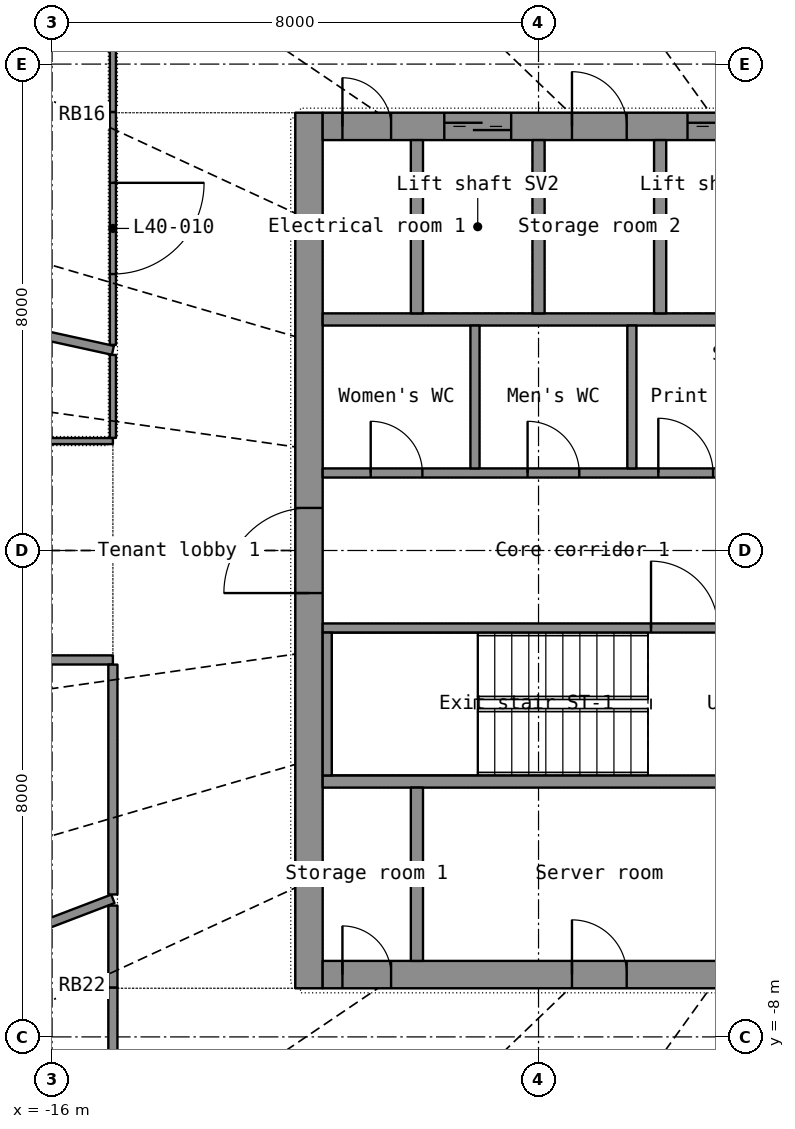
"""IFC4 building model, lengths in metres.
Left out: names, types, materials, properties, quantities, classifications, styles, units other than length and angle.
Written with IfcOpenShell. Run it as: python <this file> out.ifc"""

import sys

from ifc_helpers import new_model, si_unit, direction, frame, frame_2d, origin, place, context, subcontext, project, spatial, rectangle, extrude, element, fill, save


model = new_model("IFC4")
c1 = context("Model", 3, precision=1e-05, world=origin(), true_north=direction((0.0, 1.0)))
c2 = subcontext(c1, "Body", "Model", "MODEL_VIEW")
j1 = project(units=[si_unit("LENGTHUNIT", "METRE"), si_unit("PLANEANGLEUNIT", "RADIAN")], contexts=[c1])
p1 = place(None, origin())
s1 = spatial("IfcSite", under=j1, at=p1, CompositionType="ELEMENT")
p2 = place(p1, origin())
s2 = spatial("IfcBuilding", under=s1, at=p2, CompositionType="ELEMENT")
p3 = place(p2, frame((0.0, 0.0, 168.2)))
s3 = spatial("IfcBuildingStorey", under=s2, at=p3, CompositionType="ELEMENT", Elevation=168.2)
p4 = place(p3, frame((-11.775, -7.2, 0.0), z_axis=(0.0, 0.0, 1.0), x_axis=(0.0, 1.0, 0.0)))
e1 = element("IfcWall", 1, at=p4, inside=s3, PredefinedType="SHEAR", context=c2, shape_type="SweptSolid", body=[
    extrude(rectangle(XDim=14.4, YDim=0.45, at=frame_2d((7.2, 0.0))), origin(), (0.0, 0.0, 1.0), 3.3),
])
p5 = place(p4, frame((6.5, 0.0, 0.0)))
e2 = element("IfcOpeningElement", 2, at=p5, cuts=e1, PredefinedType="OPENING", context=c2, shape_type="SweptSolid", body=[
    extrude(rectangle(XDim=1.4, YDim=2.2, at=frame_2d((0.7, 1.1))), frame((0.0, 0.235, 0.0), z_axis=(0.0, -1.0, 0.0), x_axis=(1.0, 0.0, 0.0)), (0.0, 0.0, 1.0), 0.47),
])
p6 = place(p3, frame((-11.55, -6.975, 0.0), z_axis=(0.0, 0.0, 1.0), x_axis=(1.0, 0.0, 0.0)))
e3 = element("IfcWall", 3, at=p6, inside=s3, PredefinedType="SHEAR", context=c2, shape_type="SweptSolid", body=[
    extrude(rectangle(XDim=23.1, YDim=0.45, at=frame_2d((11.55, 0.0))), origin(), (0.0, 0.0, 1.0), 3.3),
])
p7 = place(p6, frame((20.0, 0.0, 0.0)))
e4 = element("IfcOpeningElement", 4, at=p7, cuts=e3, PredefinedType="OPENING", context=c2, shape_type="SweptSolid", body=[
    extrude(rectangle(XDim=1.1, YDim=2.2, at=frame_2d((0.55, 1.1))), frame((0.0, 0.235, 0.0), z_axis=(0.0, -1.0, 0.0), x_axis=(1.0, 0.0, 0.0)), (0.0, 0.0, 1.0), 0.47),
])
p8 = place(p6, frame((4.1, 0.0, 0.0)))
e5 = element("IfcOpeningElement", 5, at=p8, cuts=e3, PredefinedType="OPENING", context=c2, shape_type="SweptSolid", body=[
    extrude(rectangle(XDim=0.9, YDim=2.1, at=frame_2d((0.45, 1.05))), frame((0.0, 0.235, 0.0), z_axis=(0.0, -1.0, 0.0), x_axis=(1.0, 0.0, 0.0)), (0.0, 0.0, 1.0), 0.47),
])
p9 = place(p6, frame((11.1, 0.0, 0.0)))
e6 = element("IfcOpeningElement", 6, at=p9, cuts=e3, PredefinedType="OPENING", context=c2, shape_type="SweptSolid", body=[
    extrude(rectangle(XDim=0.9, YDim=2.1, at=frame_2d((0.45, 1.05))), frame((0.0, 0.235, 0.0), z_axis=(0.0, -1.0, 0.0), x_axis=(1.0, 0.0, 0.0)), (0.0, 0.0, 1.0), 0.47),
])
p10 = place(p6, frame((17.1, 0.0, 0.0)))
e7 = element("IfcOpeningElement", 7, at=p10, cuts=e3, PredefinedType="OPENING", context=c2, shape_type="SweptSolid", body=[
    extrude(rectangle(XDim=0.9, YDim=2.1, at=frame_2d((0.45, 1.05))), frame((0.0, 0.235, 0.0), z_axis=(0.0, -1.0, 0.0), x_axis=(1.0, 0.0, 0.0)), (0.0, 0.0, 1.0), 0.47),
])
p11 = place(p6, frame((0.325, 0.0, 0.0)))
e8 = element("IfcOpeningElement", 8, at=p11, cuts=e3, PredefinedType="OPENING", context=c2, shape_type="SweptSolid", body=[
    extrude(rectangle(XDim=0.8, YDim=2.05, at=frame_2d((0.4, 1.025))), frame((0.0, 0.235, 0.0), z_axis=(0.0, -1.0, 0.0), x_axis=(1.0, 0.0, 0.0)), (0.0, 0.0, 1.0), 0.47),
])
p12 = place(p6, frame((21.975, 0.0, 0.0)))
e9 = element("IfcOpeningElement", 9, at=p12, cuts=e3, PredefinedType="OPENING", context=c2, shape_type="SweptSolid", body=[
    extrude(rectangle(XDim=0.8, YDim=2.05, at=frame_2d((0.4, 1.025))), frame((0.0, 0.235, 0.0), z_axis=(0.0, -1.0, 0.0), x_axis=(1.0, 0.0, 0.0)), (0.0, 0.0, 1.0), 0.47),
])
p13 = place(p3, frame((-11.55, 6.975, 0.0), z_axis=(0.0, 0.0, 1.0), x_axis=(1.0, 0.0, 0.0)))
e10 = element("IfcWall", 10, at=p13, inside=s3, PredefinedType="SHEAR", context=c2, shape_type="SweptSolid", body=[
    extrude(rectangle(XDim=23.1, YDim=0.45, at=frame_2d((11.55, 0.0))), origin(), (0.0, 0.0, 1.0), 3.3),
])
p14 = place(p13, frame((2.0, 0.0, 0.0)))
e11 = element("IfcOpeningElement", 11, at=p14, cuts=e10, PredefinedType="OPENING", context=c2, shape_type="SweptSolid", body=[
    extrude(rectangle(XDim=1.1, YDim=2.2, at=frame_2d((0.55, 1.1))), frame((0.0, 0.235, 0.0), z_axis=(0.0, -1.0, 0.0), x_axis=(1.0, 0.0, 0.0)), (0.0, 0.0, 1.0), 0.47),
])
p15 = place(p13, frame((6.0, 0.0, 0.0)))
e12 = element("IfcOpeningElement", 12, at=p15, cuts=e10, PredefinedType="OPENING", context=c2, shape_type="SweptSolid", body=[
    extrude(rectangle(XDim=1.1, YDim=2.2, at=frame_2d((0.55, 1.1))), frame((0.0, 0.235, 0.0), z_axis=(0.0, -1.0, 0.0), x_axis=(1.0, 0.0, 0.0)), (0.0, 0.0, 1.0), 0.47),
])
p16 = place(p13, frame((8.0, 0.0, 0.0)))
e13 = element("IfcOpeningElement", 13, at=p16, cuts=e10, PredefinedType="OPENING", context=c2, shape_type="SweptSolid", body=[
    extrude(rectangle(XDim=1.1, YDim=2.2, at=frame_2d((0.55, 1.1))), frame((0.0, 0.235, 0.0), z_axis=(0.0, -1.0, 0.0), x_axis=(1.0, 0.0, 0.0)), (0.0, 0.0, 1.0), 0.47),
])
p17 = place(p13, frame((10.0, 0.0, 0.0)))
e14 = element("IfcOpeningElement", 14, at=p17, cuts=e10, PredefinedType="OPENING", context=c2, shape_type="SweptSolid", body=[
    extrude(rectangle(XDim=1.1, YDim=2.2, at=frame_2d((0.55, 1.1))), frame((0.0, 0.235, 0.0), z_axis=(0.0, -1.0, 0.0), x_axis=(1.0, 0.0, 0.0)), (0.0, 0.0, 1.0), 0.47),
])
p18 = place(p13, frame((12.0, 0.0, 0.0)))
e15 = element("IfcOpeningElement", 15, at=p18, cuts=e10, PredefinedType="OPENING", context=c2, shape_type="SweptSolid", body=[
    extrude(rectangle(XDim=1.1, YDim=2.2, at=frame_2d((0.55, 1.1))), frame((0.0, 0.235, 0.0), z_axis=(0.0, -1.0, 0.0), x_axis=(1.0, 0.0, 0.0)), (0.0, 0.0, 1.0), 0.47),
])
p19 = place(p13, frame((14.0, 0.0, 0.0)))
e16 = element("IfcOpeningElement", 16, at=p19, cuts=e10, PredefinedType="OPENING", context=c2, shape_type="SweptSolid", body=[
    extrude(rectangle(XDim=1.1, YDim=2.2, at=frame_2d((0.55, 1.1))), frame((0.0, 0.235, 0.0), z_axis=(0.0, -1.0, 0.0), x_axis=(1.0, 0.0, 0.0)), (0.0, 0.0, 1.0), 0.47),
])
p20 = place(p13, frame((16.0, 0.0, 0.0)))
e17 = element("IfcOpeningElement", 17, at=p20, cuts=e10, PredefinedType="OPENING", context=c2, shape_type="SweptSolid", body=[
    extrude(rectangle(XDim=1.1, YDim=2.2, at=frame_2d((0.55, 1.1))), frame((0.0, 0.235, 0.0), z_axis=(0.0, -1.0, 0.0), x_axis=(1.0, 0.0, 0.0)), (0.0, 0.0, 1.0), 0.47),
])
p21 = place(p13, frame((18.0, 0.0, 0.0)))
e18 = element("IfcOpeningElement", 18, at=p21, cuts=e10, PredefinedType="OPENING", context=c2, shape_type="SweptSolid", body=[
    extrude(rectangle(XDim=1.1, YDim=2.2, at=frame_2d((0.55, 1.1))), frame((0.0, 0.235, 0.0), z_axis=(0.0, -1.0, 0.0), x_axis=(1.0, 0.0, 0.0)), (0.0, 0.0, 1.0), 0.47),
])
p22 = place(p13, frame((20.0, 0.0, 0.0)))
e19 = element("IfcOpeningElement", 19, at=p22, cuts=e10, PredefinedType="OPENING", context=c2, shape_type="SweptSolid", body=[
    extrude(rectangle(XDim=1.1, YDim=2.2, at=frame_2d((0.55, 1.1))), frame((0.0, 0.235, 0.0), z_axis=(0.0, -1.0, 0.0), x_axis=(1.0, 0.0, 0.0)), (0.0, 0.0, 1.0), 0.47),
])
p23 = place(p13, frame((4.1, 0.0, 0.0)))
e20 = element("IfcOpeningElement", 20, at=p23, cuts=e10, PredefinedType="OPENING", context=c2, shape_type="SweptSolid", body=[
    extrude(rectangle(XDim=0.9, YDim=2.1, at=frame_2d((0.45, 1.05))), frame((0.0, 0.235, 0.0), z_axis=(0.0, -1.0, 0.0), x_axis=(1.0, 0.0, 0.0)), (0.0, 0.0, 1.0), 0.47),
])
p24 = place(p13, frame((0.325, 0.0, 0.0)))
e21 = element("IfcOpeningElement", 21, at=p24, cuts=e10, PredefinedType="OPENING", context=c2, shape_type="SweptSolid", body=[
    extrude(rectangle(XDim=0.8, YDim=2.05, at=frame_2d((0.4, 1.025))), frame((0.0, 0.235, 0.0), z_axis=(0.0, -1.0, 0.0), x_axis=(1.0, 0.0, 0.0)), (0.0, 0.0, 1.0), 0.47),
])
p25 = place(p13, frame((21.975, 0.0, 0.0)))
e22 = element("IfcOpeningElement", 22, at=p25, cuts=e10, PredefinedType="OPENING", context=c2, shape_type="SweptSolid", body=[
    extrude(rectangle(XDim=0.8, YDim=2.05, at=frame_2d((0.4, 1.025))), frame((0.0, 0.235, 0.0), z_axis=(0.0, -1.0, 0.0), x_axis=(1.0, 0.0, 0.0)), (0.0, 0.0, 1.0), 0.47),
])
for number, where, z_axis, x_axis in (
    (23, (-11.55, -3.8, 0.0), (0.0, 0.0, 1.0), (1.0, 0.0, 0.0)),
    (24, (-11.55, 3.8, 0.0), (0.0, 0.0, 1.0), (1.0, 0.0, 0.0)),
):
    element("IfcWall", number, at=place(p3, frame(where, z_axis=z_axis, x_axis=x_axis)), inside=s3, PredefinedType="SHEAR", context=c2, shape_type="SweptSolid", body=[
        extrude(rectangle(XDim=23.1, YDim=0.2, at=frame_2d((11.55, 0.0))), origin(), (0.0, 0.0, 1.0), 3.3),
    ])
for number, where, z_axis, x_axis in (
    (25, (-10.0, -6.75, 0.0), (0.0, 0.0, 1.0), (0.0, 1.0, 0.0)),
    (26, (-10.0, 3.9, 0.0), (0.0, 0.0, 1.0), (0.0, 1.0, 0.0)),
    (27, (-8.0, 3.9, 0.0), (0.0, 0.0, 1.0), (0.0, 1.0, 0.0)),
    (28, (-6.0, 3.9, 0.0), (0.0, 0.0, 1.0), (0.0, 1.0, 0.0)),
):
    element("IfcWall", number, at=place(p3, frame(where, z_axis=z_axis, x_axis=x_axis)), inside=s3, PredefinedType="SHEAR", context=c2, shape_type="SweptSolid", body=[
        extrude(rectangle(XDim=2.85, YDim=0.2, at=frame_2d((1.425, 0.0))), origin(), (0.0, 0.0, 1.0), 3.3),
    ])
p26 = place(p3, frame((-11.55, -1.275, 0.0), z_axis=(0.0, 0.0, 1.0), x_axis=(1.0, 0.0, 0.0)))
e29 = element("IfcWall", 29, at=p26, inside=s3, PredefinedType="SHEAR", context=c2, shape_type="SweptSolid", body=[
    extrude(rectangle(XDim=8.55, YDim=0.15, at=frame_2d((4.275, 0.0))), origin(), (0.0, 0.0, 1.0), 3.3),
])
p27 = place(p26, frame((5.4, 0.0, 0.0)))
e30 = element("IfcOpeningElement", 30, at=p27, cuts=e29, PredefinedType="OPENING", context=c2, shape_type="SweptSolid", body=[
    extrude(rectangle(XDim=1.1, YDim=2.15, at=frame_2d((0.55, 1.075))), frame((0.0, 0.085, 0.0), z_axis=(0.0, -1.0, 0.0), x_axis=(1.0, 0.0, 0.0)), (0.0, 0.0, 1.0), 0.17),
])
p28 = place(p26, frame((7.2, 0.0, 0.0)))
e31 = element("IfcOpeningElement", 31, at=p28, cuts=e29, PredefinedType="OPENING", context=c2, shape_type="SweptSolid", body=[
    extrude(rectangle(XDim=0.9, YDim=2.1, at=frame_2d((0.45, 1.05))), frame((0.0, 0.085, 0.0), z_axis=(0.0, -1.0, 0.0), x_axis=(1.0, 0.0, 0.0)), (0.0, 0.0, 1.0), 0.17),
])
p29 = place(p3, frame((-11.55, 1.275, 0.0), z_axis=(0.0, 0.0, 1.0), x_axis=(1.0, 0.0, 0.0)))
e32 = element("IfcWall", 32, at=p29, inside=s3, PredefinedType="PARTITIONING", context=c2, shape_type="SweptSolid", body=[
    extrude(rectangle(XDim=8.55, YDim=0.15, at=frame_2d((4.275, 0.0))), origin(), (0.0, 0.0, 1.0), 3.3),
])
p30 = place(p29, frame((0.79, 0.0, 0.0)))
e33 = element("IfcOpeningElement", 33, at=p30, cuts=e32, PredefinedType="OPENING", context=c2, shape_type="SweptSolid", body=[
    extrude(rectangle(XDim=0.85, YDim=2.1, at=frame_2d((0.425, 1.05))), frame((0.0, 0.085, 0.0), z_axis=(0.0, -1.0, 0.0), x_axis=(1.0, 0.0, 0.0)), (0.0, 0.0, 1.0), 0.17),
])
p31 = place(p29, frame((3.37, 0.0, 0.0)))
e34 = element("IfcOpeningElement", 34, at=p31, cuts=e32, PredefinedType="OPENING", context=c2, shape_type="SweptSolid", body=[
    extrude(rectangle(XDim=0.85, YDim=2.1, at=frame_2d((0.425, 1.05))), frame((0.0, 0.085, 0.0), z_axis=(0.0, -1.0, 0.0), x_axis=(1.0, 0.0, 0.0)), (0.0, 0.0, 1.0), 0.17),
])
p32 = place(p29, frame((5.52, 0.0, 0.0)))
e35 = element("IfcOpeningElement", 35, at=p32, cuts=e32, PredefinedType="OPENING", context=c2, shape_type="SweptSolid", body=[
    extrude(rectangle(XDim=0.9, YDim=2.1, at=frame_2d((0.45, 1.05))), frame((0.0, 0.085, 0.0), z_axis=(0.0, -1.0, 0.0), x_axis=(1.0, 0.0, 0.0)), (0.0, 0.0, 1.0), 0.17),
])
p33 = place(p29, frame((7.29, 0.0, 0.0)))
e36 = element("IfcOpeningElement", 36, at=p33, cuts=e32, PredefinedType="OPENING", context=c2, shape_type="SweptSolid", body=[
    extrude(rectangle(XDim=0.9, YDim=2.1, at=frame_2d((0.45, 1.05))), frame((0.0, 0.085, 0.0), z_axis=(0.0, -1.0, 0.0), x_axis=(1.0, 0.0, 0.0)), (0.0, 0.0, 1.0), 0.17),
])
p34 = place(p3, frame((-11.475, -3.7, 0.0), z_axis=(0.0, 0.0, 1.0), x_axis=(0.0, 1.0, 0.0)))
e37 = element("IfcWall", 37, at=p34, inside=s3, PredefinedType="SHEAR", context=c2, shape_type="SweptSolid", body=[
    extrude(rectangle(XDim=2.35, YDim=0.15, at=frame_2d((1.175, 0.0))), origin(), (0.0, 0.0, 1.0), 3.3),
])
for number, where, z_axis, x_axis in (
    (38, (-9.045, 1.35, 0.0), (0.0, 0.0, 1.0), (0.0, 1.0, 0.0)),
    (39, (-6.465, 1.35, 0.0), (0.0, 0.0, 1.0), (0.0, 1.0, 0.0)),
):
    element("IfcWall", number, at=place(p3, frame(where, z_axis=z_axis, x_axis=x_axis)), inside=s3, PredefinedType="PARTITIONING", context=c2, shape_type="SweptSolid", body=[
        extrude(rectangle(XDim=2.35, YDim=0.15, at=frame_2d((1.175, 0.0))), origin(), (0.0, 0.0, 1.0), 3.3),
    ])
p35 = place(p3, frame((-22.61, 4.962, 0.0), z_axis=(0.0, 0.0, 1.0), x_axis=(0.976752185, -0.214371566, 0.0)))
e40 = element("IfcWall", 40, at=p35, inside=s3, PredefinedType="PARTITIONING", context=c2, shape_type="SweptSolid", body=[
    extrude(rectangle(XDim=7.791, YDim=0.15, at=frame_2d((3.896, 0.0))), origin(), (0.0, 0.0, 1.0), 2.4),
])
p36 = place(p3, frame((-21.21, -8.101, 0.0), z_axis=(0.0, 0.0, 1.0), x_axis=(0.934180775, 0.356800056, 0.0)))
e41 = element("IfcWall", 41, at=p36, inside=s3, PredefinedType="PARTITIONING", context=c2, shape_type="SweptSolid", body=[
    extrude(rectangle(XDim=6.647, YDim=0.15, at=frame_2d((3.324, 0.0))), origin(), (0.0, 0.0, 1.0), 2.4),
])
p37 = place(p3, frame((-20.766, -1.8, 0.0), z_axis=(0.0, 0.0, 1.0), x_axis=(1.0, 0.0, 0.0)))
e42 = element("IfcWall", 42, at=p37, inside=s3, PredefinedType="PARTITIONING", context=c2, shape_type="SweptSolid", body=[
    extrude(rectangle(XDim=5.766, YDim=0.15, at=frame_2d((2.883, 0.0))), origin(), (0.0, 0.0, 1.0), 2.4),
])
p38 = place(p37, frame((2.408, 0.0, 0.0)))
e43 = element("IfcOpeningElement", 43, at=p38, cuts=e42, PredefinedType="OPENING", context=c2, shape_type="SweptSolid", body=[
    extrude(rectangle(XDim=0.95, YDim=2.15, at=frame_2d((0.475, 1.075))), frame((0.0, 0.085, 0.0), z_axis=(0.0, -1.0, 0.0), x_axis=(1.0, 0.0, 0.0)), (0.0, 0.0, 1.0), 0.17),
])
p39 = place(p3, frame((-15.0, 1.8, 0.0), z_axis=(0.0, 0.0, 1.0), x_axis=(-1.0, 0.0, 0.0)))
e44 = element("IfcWall", 44, at=p39, inside=s3, PredefinedType="PARTITIONING", context=c2, shape_type="SweptSolid", body=[
    extrude(rectangle(XDim=5.766, YDim=0.1, at=frame_2d((2.883, 0.0))), origin(), (0.0, 0.0, 1.0), 2.4),
])
p40 = place(p39, frame((2.133, 0.0, 0.0)))
e45 = element("IfcOpeningElement", 45, at=p40, cuts=e44, PredefinedType="OPENING", context=c2, shape_type="SweptSolid", body=[
    extrude(rectangle(XDim=1.5, YDim=2.4, at=frame_2d((0.75, 1.2))), frame((0.0, 0.06, 0.0), z_axis=(0.0, -1.0, 0.0), x_axis=(1.0, 0.0, 0.0)), (0.0, 0.0, 1.0), 0.12),
])
p41 = place(p3, frame((-15.0, -1.877, 0.0), z_axis=(0.0, 0.0, 1.0), x_axis=(0.0, -1.0, 0.0)))
e46 = element("IfcWall", 46, at=p41, inside=s3, PredefinedType="PARTITIONING", context=c2, shape_type="SweptSolid", body=[
    extrude(rectangle(XDim=3.78, YDim=0.15, at=frame_2d((1.89, 0.0))), origin(), (0.0, 0.0, 1.0), 2.4),
])
p42 = place(p3, frame((-15.0, 7.212, 0.0), z_axis=(0.0, 0.0, 1.0), x_axis=(0.0, -1.0, 0.0)))
e47 = element("IfcWall", 47, at=p42, inside=s3, PredefinedType="PARTITIONING", context=c2, shape_type="SweptSolid", body=[
    extrude(rectangle(XDim=3.83, YDim=0.1, at=frame_2d((1.915, 0.0))), origin(), (0.0, 0.0, 1.0), 2.4),
])
p43 = place(p42, frame((1.165, 0.0, 0.0)))
e48 = element("IfcOpeningElement", 48, at=p43, cuts=e47, PredefinedType="OPENING", context=c2, shape_type="SweptSolid", body=[
    extrude(rectangle(XDim=1.5, YDim=2.4, at=frame_2d((0.75, 1.2))), frame((0.0, 0.06, 0.0), z_axis=(0.0, -1.0, 0.0), x_axis=(1.0, 0.0, 0.0)), (0.0, 0.0, 1.0), 0.12),
])
p44 = place(p3, frame((-15.0, -7.188, 0.0), z_axis=(0.0, 0.0, 1.0), x_axis=(0.0, -1.0, 0.0)))
e49 = element("IfcWall", 49, at=p44, inside=s3, PredefinedType="PARTITIONING", context=c2, shape_type="SweptSolid", body=[
    extrude(rectangle(XDim=2.335, YDim=0.15, at=frame_2d((1.167, 0.0))), origin(), (0.0, 0.0, 1.0), 2.4),
])
p45 = place(p3, frame((-15.0, 3.217, 0.0), z_axis=(0.0, 0.0, 1.0), x_axis=(0.0, -1.0, 0.0)))
e50 = element("IfcWall", 50, at=p45, inside=s3, PredefinedType="PARTITIONING", context=c2, shape_type="SweptSolid", body=[
    extrude(rectangle(XDim=1.365, YDim=0.1, at=frame_2d((0.682, 0.0))), origin(), (0.0, 0.0, 1.0), 2.4),
])
p46 = place(p3, frame((-15.0, -5.84, 0.0), z_axis=(0.0, 0.0, 1.0), x_axis=(0.0, -1.0, 0.0)))
e51 = element("IfcWall", 51, at=p46, inside=s3, PredefinedType="PARTITIONING", context=c2, shape_type="SweptSolid", body=[
    extrude(rectangle(XDim=1.347, YDim=0.15, at=frame_2d((0.673, 0.0))), origin(), (0.0, 0.0, 1.0), 2.4),
])
p47 = place(p3, frame((-15.0, 8.536, 0.0), z_axis=(0.0, 0.0, 1.0), x_axis=(0.0, -1.0, 0.0)))
e52 = element("IfcWall", 52, at=p47, inside=s3, PredefinedType="PARTITIONING", context=c2, shape_type="SweptSolid", body=[
    extrude(rectangle(XDim=1.323, YDim=0.1, at=frame_2d((0.662, 0.0))), origin(), (0.0, 0.0, 1.0), 2.4),
])
p48 = place(p8, origin())
e53 = element("IfcDoor", 53, at=p48, inside=s3, OperationType="SINGLE_SWING_LEFT", PredefinedType="DOOR", context=c2, shape_type="SweptSolid", body=[
    extrude(rectangle(XDim=0.9, YDim=2.1, at=frame_2d((0.45, 1.05))), frame((0.0, 0.025, 0.0), z_axis=(0.0, -1.0, 0.0), x_axis=(1.0, 0.0, 0.0)), (0.0, 0.0, 1.0), 0.05),
])
fill(e5, e53)
p49 = place(p11, origin())
e54 = element("IfcDoor", 54, at=p49, inside=s3, OperationType="SINGLE_SWING_LEFT", PredefinedType="DOOR", context=c2, shape_type="SweptSolid", body=[
    extrude(rectangle(XDim=0.8, YDim=2.05, at=frame_2d((0.4, 1.025))), frame((0.0, 0.025, 0.0), z_axis=(0.0, -1.0, 0.0), x_axis=(1.0, 0.0, 0.0)), (0.0, 0.0, 1.0), 0.05),
])
fill(e8, e54)
p50 = place(p14, origin())
e55 = element("IfcDoor", 55, at=p50, inside=s3, OperationType="DOUBLE_DOOR_SLIDING", PredefinedType="DOOR", context=c2, shape_type="SweptSolid", body=[
    extrude(rectangle(XDim=1.1, YDim=2.2, at=frame_2d((0.55, 1.1))), frame((0.0, 0.025, 0.0), z_axis=(0.0, -1.0, 0.0), x_axis=(1.0, 0.0, 0.0)), (0.0, 0.0, 1.0), 0.05),
])
fill(e11, e55)
p51 = place(p15, origin())
e56 = element("IfcDoor", 56, at=p51, inside=s3, OperationType="DOUBLE_DOOR_SLIDING", PredefinedType="DOOR", context=c2, shape_type="SweptSolid", body=[
    extrude(rectangle(XDim=1.1, YDim=2.2, at=frame_2d((0.55, 1.1))), frame((0.0, 0.025, 0.0), z_axis=(0.0, -1.0, 0.0), x_axis=(1.0, 0.0, 0.0)), (0.0, 0.0, 1.0), 0.05),
])
fill(e12, e56)
p52 = place(p23, origin())
e57 = element("IfcDoor", 57, at=p52, inside=s3, OperationType="SINGLE_SWING_LEFT", PredefinedType="DOOR", context=c2, shape_type="SweptSolid", body=[
    extrude(rectangle(XDim=0.9, YDim=2.1, at=frame_2d((0.45, 1.05))), frame((0.0, 0.025, 0.0), z_axis=(0.0, -1.0, 0.0), x_axis=(1.0, 0.0, 0.0)), (0.0, 0.0, 1.0), 0.05),
])
fill(e20, e57)
p53 = place(p24, origin())
e58 = element("IfcDoor", 58, at=p53, inside=s3, OperationType="SINGLE_SWING_LEFT", PredefinedType="DOOR", context=c2, shape_type="SweptSolid", body=[
    extrude(rectangle(XDim=0.8, YDim=2.05, at=frame_2d((0.4, 1.025))), frame((0.0, 0.025, 0.0), z_axis=(0.0, -1.0, 0.0), x_axis=(1.0, 0.0, 0.0)), (0.0, 0.0, 1.0), 0.05),
])
fill(e21, e58)
p54 = place(p5, origin())
e59 = element("IfcDoor", 59, at=p54, inside=s3, OperationType="DOUBLE_DOOR_SINGLE_SWING", PredefinedType="DOOR", context=c2, shape_type="SweptSolid", body=[
    extrude(rectangle(XDim=1.4, YDim=2.2, at=frame_2d((0.7, 1.1))), frame((0.0, 0.025, 0.0), z_axis=(0.0, -1.0, 0.0), x_axis=(1.0, 0.0, 0.0)), (0.0, 0.0, 1.0), 0.05),
])
fill(e2, e59)
p55 = place(p27, origin())
e60 = element("IfcDoor", 60, at=p55, inside=s3, OperationType="SINGLE_SWING_LEFT", PredefinedType="DOOR", context=c2, shape_type="SweptSolid", body=[
    extrude(rectangle(XDim=1.1, YDim=2.15, at=frame_2d((0.55, 1.075))), frame((0.0, 0.025, 0.0), z_axis=(0.0, -1.0, 0.0), x_axis=(1.0, 0.0, 0.0)), (0.0, 0.0, 1.0), 0.05),
])
fill(e30, e60)
p56 = place(p30, origin())
e61 = element("IfcDoor", 61, at=p56, inside=s3, OperationType="SINGLE_SWING_LEFT", PredefinedType="DOOR", context=c2, shape_type="SweptSolid", body=[
    extrude(rectangle(XDim=0.85, YDim=2.1, at=frame_2d((0.425, 1.05))), frame((0.0, 0.025, 0.0), z_axis=(0.0, -1.0, 0.0), x_axis=(1.0, 0.0, 0.0)), (0.0, 0.0, 1.0), 0.05),
])
fill(e33, e61)
p57 = place(p31, origin())
e62 = element("IfcDoor", 62, at=p57, inside=s3, OperationType="SINGLE_SWING_LEFT", PredefinedType="DOOR", context=c2, shape_type="SweptSolid", body=[
    extrude(rectangle(XDim=0.85, YDim=2.1, at=frame_2d((0.425, 1.05))), frame((0.0, 0.025, 0.0), z_axis=(0.0, -1.0, 0.0), x_axis=(1.0, 0.0, 0.0)), (0.0, 0.0, 1.0), 0.05),
])
fill(e34, e62)
p58 = place(p32, origin())
e63 = element("IfcDoor", 63, at=p58, inside=s3, OperationType="SINGLE_SWING_LEFT", PredefinedType="DOOR", context=c2, shape_type="SweptSolid", body=[
    extrude(rectangle(XDim=0.9, YDim=2.1, at=frame_2d((0.45, 1.05))), frame((0.0, 0.025, 0.0), z_axis=(0.0, -1.0, 0.0), x_axis=(1.0, 0.0, 0.0)), (0.0, 0.0, 1.0), 0.05),
])
fill(e35, e63)
p59 = place(p43, origin())
e64 = element("IfcDoor", 64, at=p59, inside=s3, OperationType="DOUBLE_DOOR_SINGLE_SWING", PredefinedType="DOOR", context=c2, shape_type="SweptSolid", body=[
    extrude(rectangle(XDim=1.5, YDim=2.4, at=frame_2d((0.75, 1.2))), frame((0.0, 0.025, 0.0), z_axis=(0.0, -1.0, 0.0), x_axis=(1.0, 0.0, 0.0)), (0.0, 0.0, 1.0), 0.05),
])
fill(e48, e64)
save(model, sys.argv[1])
